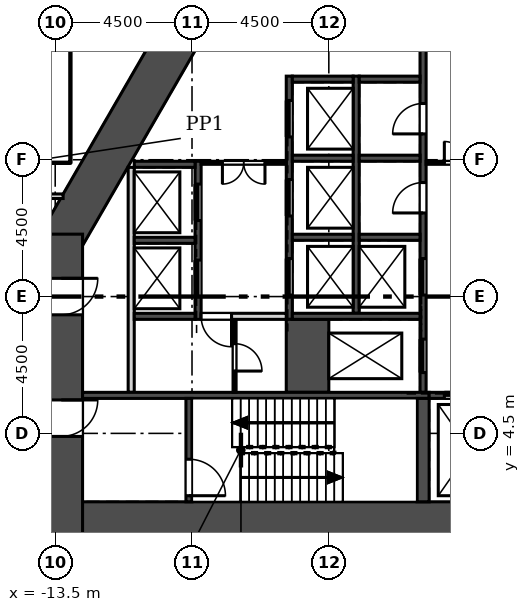
"""IFC4 building model, lengths in metres.
Left out: names, types, materials, properties, quantities, classifications, styles, units other than length and angle.
Written with IfcOpenShell. Run it as: python <this file> out.ifc"""

import sys

from ifc_helpers import new_model, si_unit, direction, frame, frame_2d, origin, place, context, subcontext, project, spatial, rectangle, extrude, element, fill, save


model = new_model("IFC4")
c1 = context("Model", 3, precision=1e-05, world=origin(), true_north=direction((0.0, 1.0)))
c2 = subcontext(c1, "Body", "Model", "MODEL_VIEW")
j1 = project(units=[si_unit("LENGTHUNIT", "METRE"), si_unit("PLANEANGLEUNIT", "RADIAN")], contexts=[c1])
p1 = place(None, origin())
s1 = spatial("IfcSite", under=j1, at=p1, CompositionType="ELEMENT")
p2 = place(p1, origin())
s2 = spatial("IfcBuilding", under=s1, at=p2, CompositionType="ELEMENT")
p3 = place(p2, frame((0.0, 0.0, -8.0)))
s3 = spatial("IfcBuildingStorey", under=s2, at=p3, CompositionType="ELEMENT", Elevation=-8.0)
p4 = place(p3, frame((-4.856, 74.528, 0.0), z_axis=(0.0, 0.0, 1.0), x_axis=(-0.499999312333, -0.866025800809, 0.0)))
e1 = element("IfcWall", 1, at=p4, inside=s3, PredefinedType="SOLIDWALL", context=c2, shape_type="SweptSolid", body=[
    extrude(rectangle(XDim=76.231, YDim=0.6, at=frame_2d((38.115, 0.0))), origin(), (0.0, 0.0, 1.0), 7.6),
])
p5 = place(p3, frame((-14.0, 1.55, 0.0), z_axis=(0.0, 0.0, 1.0), x_axis=(1.0, 0.0, 0.0)))
e2 = element("IfcWall", 2, at=p5, inside=s3, PredefinedType="SHEAR", context=c2, shape_type="SweptSolid", body=[
    extrude(rectangle(XDim=28.0, YDim=1.4, at=frame_2d((14.0, 0.0))), origin(), (0.0, 0.0, 1.0), 8.0),
])
p6 = place(p3, frame((-8.805, 18.65, 0.0), z_axis=(0.0, 0.0, 1.0), x_axis=(-0.50000187635, -0.866024320471, 0.0)))
e3 = element("IfcWall", 3, at=p6, inside=s3, PredefinedType="SHEAR", context=c2, shape_type="SweptSolid", body=[
    extrude(rectangle(XDim=9.177, YDim=1.4, at=frame_2d((4.588, 0.0))), origin(), (0.0, 0.0, 1.0), 8.0),
])
p7 = place(p3, frame((-13.3, 11.052, 0.0), z_axis=(0.0, 0.0, 1.0), x_axis=(0.0, -1.0, 0.0)))
e4 = element("IfcWall", 4, at=p7, inside=s3, PredefinedType="SHEAR", context=c2, shape_type="SweptSolid", body=[
    extrude(rectangle(XDim=10.202, YDim=1.4, at=frame_2d((5.101, 0.0))), origin(), (0.0, 0.0, 1.0), 8.0),
])
p8 = place(p7, frame((5.453, 0.0, 0.0)))
e5 = element("IfcOpeningElement", 5, at=p8, cuts=e4, PredefinedType="OPENING", context=c2, shape_type="SweptSolid", body=[
    extrude(rectangle(XDim=1.2, YDim=2.1, at=frame_2d((0.6, 1.05))), frame((0.0, 0.71, 0.0), z_axis=(0.0, -1.0, 0.0), x_axis=(1.0, 0.0, 0.0)), (0.0, 0.0, 1.0), 1.42),
])
p9 = place(p7, frame((1.453, 0.0, 0.0)))
e6 = element("IfcOpeningElement", 6, at=p9, cuts=e4, PredefinedType="OPENING", context=c2, shape_type="SweptSolid", body=[
    extrude(rectangle(XDim=1.2, YDim=2.1, at=frame_2d((0.6, 1.05))), frame((0.0, 0.71, 0.0), z_axis=(0.0, -1.0, 0.0), x_axis=(1.0, 0.0, 0.0)), (0.0, 0.0, 1.0), 1.42),
])
p10 = place(p3, frame((-11.0, 5.85, 0.0), z_axis=(0.0, 0.0, 1.0), x_axis=(0.0, 1.0, 0.0)))
e7 = element("IfcWall", 7, at=p10, inside=s3, PredefinedType="SOLIDWALL", context=c2, shape_type="SweptSolid", body=[
    extrude(rectangle(XDim=7.4, YDim=0.2, at=frame_2d((3.7, 0.0))), origin(), (0.0, 0.0, 1.0), 7.6),
])
p11 = place(p3, frame((-8.8, 8.25, -0.35), z_axis=(0.0, 0.0, 1.0), x_axis=(0.0, 1.0, 0.0)))
e8 = element("IfcWall", 8, at=p11, inside=s3, PredefinedType="SOLIDWALL", context=c2, shape_type="SweptSolid", body=[
    extrude(rectangle(XDim=5.2, YDim=0.2, at=frame_2d((2.6, 0.0))), origin(), (0.0, 0.0, 1.0), 7.95),
])
p12 = place(p11, frame((0.75, 0.0, 0.35)))
e9 = element("IfcOpeningElement", 9, at=p12, cuts=e8, PredefinedType="OPENING", context=c2, shape_type="SweptSolid", body=[
    extrude(rectangle(XDim=1.2, YDim=2.1, at=frame_2d((0.6, 1.05))), frame((0.0, 0.11, 0.0), z_axis=(0.0, -1.0, 0.0), x_axis=(1.0, 0.0, 0.0)), (0.0, 0.0, 1.0), 0.22),
])
p13 = place(p11, frame((3.25, 0.0, 0.35)))
e10 = element("IfcOpeningElement", 10, at=p13, cuts=e8, PredefinedType="OPENING", context=c2, shape_type="SweptSolid", body=[
    extrude(rectangle(XDim=1.2, YDim=2.1, at=frame_2d((0.6, 1.05))), frame((0.0, 0.11, 0.0), z_axis=(0.0, -1.0, 0.0), x_axis=(1.0, 0.0, 0.0)), (0.0, 0.0, 1.0), 0.22),
])
p14 = place(p3, frame((-5.8, 8.25, -0.35), z_axis=(0.0, 0.0, 1.0), x_axis=(0.0, 1.0, 0.0)))
e11 = element("IfcWall", 11, at=p14, inside=s3, PredefinedType="SOLIDWALL", context=c2, shape_type="SweptSolid", body=[
    extrude(rectangle(XDim=8.0, YDim=0.2, at=frame_2d((4.0, 0.0))), origin(), (0.0, 0.0, 1.0), 7.95),
])
p15 = place(p14, frame((0.8, 0.0, 0.35)))
e12 = element("IfcOpeningElement", 12, at=p15, cuts=e11, PredefinedType="OPENING", context=c2, shape_type="SweptSolid", body=[
    extrude(rectangle(XDim=1.2, YDim=2.1, at=frame_2d((0.6, 1.05))), frame((0.0, 0.11, 0.0), z_axis=(0.0, -1.0, 0.0), x_axis=(1.0, 0.0, 0.0)), (0.0, 0.0, 1.0), 0.22),
])
p16 = place(p14, frame((3.4, 0.0, 0.35)))
e13 = element("IfcOpeningElement", 13, at=p16, cuts=e11, PredefinedType="OPENING", context=c2, shape_type="SweptSolid", body=[
    extrude(rectangle(XDim=1.2, YDim=2.1, at=frame_2d((0.6, 1.05))), frame((0.0, 0.11, 0.0), z_axis=(0.0, -1.0, 0.0), x_axis=(1.0, 0.0, 0.0)), (0.0, 0.0, 1.0), 0.22),
])
p17 = place(p14, frame((6.0, 0.0, 0.35)))
e14 = element("IfcOpeningElement", 14, at=p17, cuts=e11, PredefinedType="OPENING", context=c2, shape_type="SweptSolid", body=[
    extrude(rectangle(XDim=1.2, YDim=2.1, at=frame_2d((0.6, 1.05))), frame((0.0, 0.11, 0.0), z_axis=(0.0, -1.0, 0.0), x_axis=(1.0, 0.0, 0.0)), (0.0, 0.0, 1.0), 0.22),
])
p18 = place(p3, frame((-3.6, 8.45, -0.35), z_axis=(0.0, 0.0, 1.0), x_axis=(0.0, 1.0, 0.0)))
e15 = element("IfcWall", 15, at=p18, inside=s3, PredefinedType="SOLIDWALL", context=c2, shape_type="SweptSolid", body=[
    extrude(rectangle(XDim=7.8, YDim=0.2, at=frame_2d((3.9, 0.0))), origin(), (0.0, 0.0, 1.0), 7.95),
])
p19 = place(p3, frame((-1.4, 5.85, -0.35), z_axis=(0.0, 0.0, 1.0), x_axis=(0.0, 1.0, 0.0)))
e16 = element("IfcWall", 16, at=p19, inside=s3, PredefinedType="SOLIDWALL", context=c2, shape_type="SweptSolid", body=[
    extrude(rectangle(XDim=11.75, YDim=0.2, at=frame_2d((5.875, 0.0))), origin(), (0.0, 0.0, 1.0), 7.95),
])
p20 = place(p19, frame((3.2, 0.0, 0.35)))
e17 = element("IfcOpeningElement", 17, at=p20, cuts=e16, PredefinedType="OPENING", context=c2, shape_type="SweptSolid", body=[
    extrude(rectangle(XDim=1.2, YDim=2.1, at=frame_2d((0.6, 1.05))), frame((0.0, 0.11, 0.0), z_axis=(0.0, -1.0, 0.0), x_axis=(1.0, 0.0, 0.0)), (0.0, 0.0, 1.0), 0.22),
])
p21 = place(p19, frame((0.65, 0.0, 0.35)))
e18 = element("IfcOpeningElement", 18, at=p21, cuts=e16, PredefinedType="OPENING", context=c2, shape_type="SweptSolid", body=[
    extrude(rectangle(XDim=1.1, YDim=2.1, at=frame_2d((0.55, 1.05))), frame((0.0, 0.11, 0.0), z_axis=(0.0, -1.0, 0.0), x_axis=(1.0, 0.0, 0.0)), (0.0, 0.0, 1.0), 0.22),
])
p22 = place(p19, frame((5.9, 0.0, 0.35)))
e19 = element("IfcOpeningElement", 19, at=p22, cuts=e16, PredefinedType="OPENING", context=c2, shape_type="SweptSolid", body=[
    extrude(rectangle(XDim=1.0, YDim=2.1, at=frame_2d((0.5, 1.05))), frame((0.0, 0.11, 0.0), z_axis=(0.0, -1.0, 0.0), x_axis=(1.0, 0.0, 0.0)), (0.0, 0.0, 1.0), 0.22),
])
p23 = place(p19, frame((8.5, 0.0, 0.35)))
e20 = element("IfcOpeningElement", 20, at=p23, cuts=e16, PredefinedType="OPENING", context=c2, shape_type="SweptSolid", body=[
    extrude(rectangle(XDim=1.0, YDim=2.1, at=frame_2d((0.5, 1.05))), frame((0.0, 0.11, 0.0), z_axis=(0.0, -1.0, 0.0), x_axis=(1.0, 0.0, 0.0)), (0.0, 0.0, 1.0), 0.22),
])
p24 = place(p3, frame((-5.2, 5.85, -0.35), z_axis=(0.0, 0.0, 1.0), x_axis=(0.0, 1.0, 0.0)))
e21 = element("IfcWall", 21, at=p24, inside=s3, PredefinedType="SOLIDWALL", context=c2, shape_type="SweptSolid", body=[
    extrude(rectangle(XDim=2.4, YDim=1.4, at=frame_2d((1.2, 0.0))), origin(), (0.0, 0.0, 1.0), 7.95),
])
p25 = place(p3, frame((-10.9, 8.35, -0.35), z_axis=(0.0, 0.0, 1.0), x_axis=(1.0, 0.0, 0.0)))
e22 = element("IfcWall", 22, at=p25, inside=s3, PredefinedType="SOLIDWALL", context=c2, shape_type="SweptSolid", body=[
    extrude(rectangle(XDim=2.0, YDim=0.2, at=frame_2d((1.0, 0.0))), origin(), (0.0, 0.0, 1.0), 7.95),
])
p26 = place(p3, frame((-5.7, 8.35, -0.35), z_axis=(0.0, 0.0, 1.0), x_axis=(1.0, 0.0, 0.0)))
e23 = element("IfcWall", 23, at=p26, inside=s3, PredefinedType="SOLIDWALL", context=c2, shape_type="SweptSolid", body=[
    extrude(rectangle(XDim=4.2, YDim=0.2, at=frame_2d((2.1, 0.0))), origin(), (0.0, 0.0, 1.0), 7.95),
])
p27 = place(p3, frame((-12.6, 5.75, -0.35), z_axis=(0.0, 0.0, 1.0), x_axis=(1.0, 0.0, 0.0)))
e24 = element("IfcWall", 24, at=p27, inside=s3, PredefinedType="SOLIDWALL", context=c2, shape_type="SweptSolid", body=[
    extrude(rectangle(XDim=11.4, YDim=0.2, at=frame_2d((5.7, 0.0))), origin(), (0.0, 0.0, 1.0), 7.95),
])
p28 = place(p3, frame((-1.2, 5.75, -0.35), z_axis=(0.0, 0.0, 1.0), x_axis=(1.0, 0.0, 0.0)))
e25 = element("IfcWall", 25, at=p28, inside=s3, PredefinedType="SOLIDWALL", context=c2, shape_type="SweptSolid", body=[
    extrude(rectangle(XDim=2.4, YDim=0.2, at=frame_2d((1.2, 0.0))), origin(), (0.0, 0.0, 1.0), 7.95),
])
p29 = place(p28, frame((0.5, 0.0, 0.35)))
e26 = element("IfcOpeningElement", 26, at=p29, cuts=e25, PredefinedType="OPENING", context=c2, shape_type="SweptSolid", body=[
    extrude(rectangle(XDim=1.4, YDim=2.1, at=frame_2d((0.7, 1.05))), frame((0.0, 0.11, 0.0), z_axis=(0.0, -1.0, 0.0), x_axis=(1.0, 0.0, 0.0)), (0.0, 0.0, 1.0), 0.22),
])
p30 = place(p3, frame((-9.1, 2.25, -0.35), z_axis=(0.0, 0.0, 1.0), x_axis=(0.0, 1.0, 0.0)))
e27 = element("IfcWall", 27, at=p30, inside=s3, PredefinedType="SOLIDWALL", context=c2, shape_type="SweptSolid", body=[
    extrude(rectangle(XDim=3.4, YDim=0.2, at=frame_2d((1.7, 0.0))), origin(), (0.0, 0.0, 1.0), 7.95),
])
p31 = place(p30, frame((0.2, 0.0, 0.35)))
e28 = element("IfcOpeningElement", 28, at=p31, cuts=e27, PredefinedType="OPENING", context=c2, shape_type="SweptSolid", body=[
    extrude(rectangle(XDim=1.2, YDim=2.1, at=frame_2d((0.6, 1.05))), frame((0.0, 0.11, 0.0), z_axis=(0.0, -1.0, 0.0), x_axis=(1.0, 0.0, 0.0)), (0.0, 0.0, 1.0), 0.22),
])
p32 = place(p3, frame((-1.4, 2.25, -0.35), z_axis=(0.0, 0.0, 1.0), x_axis=(0.0, 1.0, 0.0)))
e29 = element("IfcWall", 29, at=p32, inside=s3, PredefinedType="SOLIDWALL", context=c2, shape_type="SweptSolid", body=[
    extrude(rectangle(XDim=3.4, YDim=0.4, at=frame_2d((1.7, 0.0))), origin(), (0.0, 0.0, 1.0), 7.95),
])
for number, where, z_axis, x_axis in (
    (30, (-10.9, 10.85, -0.35), (0.0, 0.0, 1.0), (1.0, 0.0, 0.0)),
    (31, (-10.9, 13.35, -0.35), (0.0, 0.0, 1.0), (1.0, 0.0, 0.0)),
    (32, (-5.7, 10.95, -0.35), (0.0, 0.0, 1.0), (1.0, 0.0, 0.0)),
    (33, (-5.7, 13.55, -0.35), (0.0, 0.0, 1.0), (1.0, 0.0, 0.0)),
    (34, (-5.7, 16.15, -0.35), (0.0, 0.0, 1.0), (1.0, 0.0, 0.0)),
    (35, (-3.5, 10.95, -0.35), (0.0, 0.0, 1.0), (1.0, 0.0, 0.0)),
    (36, (-3.5, 13.55, -0.35), (0.0, 0.0, 1.0), (1.0, 0.0, 0.0)),
    (37, (-3.5, 16.15, -0.35), (0.0, 0.0, 1.0), (1.0, 0.0, 0.0)),
):
    element("IfcWall", number, at=place(p3, frame(where, z_axis=z_axis, x_axis=x_axis)), inside=s3, PredefinedType="SOLIDWALL", context=c2, shape_type="SweptSolid", body=[
        extrude(rectangle(XDim=2.0, YDim=0.2, at=frame_2d((1.0, 0.0))), origin(), (0.0, 0.0, 1.0), 7.95),
    ])
p33 = place(p3, frame((-8.7, 13.4, 0.0), z_axis=(0.0, 0.0, 1.0), x_axis=(1.0, 0.0, 0.0)))
e38 = element("IfcWall", 38, at=p33, inside=s3, PredefinedType="PARTITIONING", context=c2, shape_type="SweptSolid", body=[
    extrude(rectangle(XDim=2.8, YDim=0.1, at=frame_2d((1.4, 0.0))), origin(), (0.0, 0.0, 1.0), 7.6),
])
p34 = place(p33, frame((0.7, 0.0, 0.0)))
e39 = element("IfcOpeningElement", 39, at=p34, cuts=e38, PredefinedType="OPENING", context=c2, shape_type="SweptSolid", body=[
    extrude(rectangle(XDim=1.4, YDim=2.1, at=frame_2d((0.7, 1.05))), frame((0.0, 0.06, 0.0), z_axis=(0.0, -1.0, 0.0), x_axis=(1.0, 0.0, 0.0)), (0.0, 0.0, 1.0), 0.12),
])
p35 = place(p3, frame((-7.6, 5.85, 0.0), z_axis=(0.0, 0.0, 1.0), x_axis=(0.0, 1.0, 0.0)))
e40 = element("IfcWall", 40, at=p35, inside=s3, PredefinedType="PARTITIONING", context=c2, shape_type="SweptSolid", body=[
    extrude(rectangle(XDim=2.4, YDim=0.1, at=frame_2d((1.2, 0.0))), origin(), (0.0, 0.0, 1.0), 7.6),
])
p36 = place(p35, frame((0.7, 0.0, 0.0)))
e41 = element("IfcOpeningElement", 41, at=p36, cuts=e40, PredefinedType="OPENING", context=c2, shape_type="SweptSolid", body=[
    extrude(rectangle(XDim=0.9, YDim=2.1, at=frame_2d((0.45, 1.05))), frame((0.0, 0.06, 0.0), z_axis=(0.0, -1.0, 0.0), x_axis=(1.0, 0.0, 0.0)), (0.0, 0.0, 1.0), 0.12),
])
p37 = place(p3, frame((-8.7, 8.35, 0.0), z_axis=(0.0, 0.0, 1.0), x_axis=(1.0, 0.0, 0.0)))
e42 = element("IfcWall", 42, at=p37, inside=s3, PredefinedType="SOLIDWALL", context=c2, shape_type="SweptSolid", body=[
    extrude(rectangle(XDim=2.8, YDim=0.2, at=frame_2d((1.4, 0.0))), origin(), (0.0, 0.0, 1.0), 7.6),
])
p38 = place(p37, origin())
e43 = element("IfcOpeningElement", 43, at=p38, cuts=e42, PredefinedType="OPENING", context=c2, shape_type="SweptSolid", body=[
    extrude(rectangle(XDim=1.0, YDim=2.1, at=frame_2d((0.5, 1.05))), frame((0.0, 0.11, 0.0), z_axis=(0.0, -1.0, 0.0), x_axis=(1.0, 0.0, 0.0)), (0.0, 0.0, 1.0), 0.22),
])
p39 = place(p3, frame((-1.3, 13.4, 0.0), z_axis=(0.0, 0.0, 1.0), x_axis=(1.0, 0.0, 0.0)))
e44 = element("IfcWall", 44, at=p39, inside=s3, PredefinedType="PARTITIONING", context=c2, shape_type="SweptSolid", body=[
    extrude(rectangle(XDim=2.6, YDim=0.1, at=frame_2d((1.3, 0.0))), origin(), (0.0, 0.0, 1.0), 7.6),
])
p40 = place(p39, frame((0.6, 0.0, 0.0)))
e45 = element("IfcOpeningElement", 45, at=p40, cuts=e44, PredefinedType="OPENING", context=c2, shape_type="SweptSolid", body=[
    extrude(rectangle(XDim=1.4, YDim=2.1, at=frame_2d((0.7, 1.05))), frame((0.0, 0.06, 0.0), z_axis=(0.0, -1.0, 0.0), x_axis=(1.0, 0.0, 0.0)), (0.0, 0.0, 1.0), 0.12),
])
p41 = place(p3, frame((-30.502, 12.3, 0.0), z_axis=(0.0, 0.0, 1.0), x_axis=(1.0, 0.0, 0.0)))
e46 = element("IfcWall", 46, at=p41, inside=s3, PredefinedType="PARTITIONING", context=c2, shape_type="SweptSolid", body=[
    extrude(rectangle(XDim=17.263, YDim=0.15, at=frame_2d((8.631, 0.0))), origin(), (0.0, 0.0, 1.0), 7.6),
])
p42 = place(p41, frame((9.602, 0.0, 0.0)))
e47 = element("IfcOpeningElement", 47, at=p42, cuts=e46, PredefinedType="OPENING", context=c2, shape_type="SweptSolid", body=[
    extrude(rectangle(XDim=1.8, YDim=2.1, at=frame_2d((0.9, 1.05))), frame((0.0, 0.085, 0.0), z_axis=(0.0, -1.0, 0.0), x_axis=(1.0, 0.0, 0.0)), (0.0, 0.0, 1.0), 0.17),
])
p43 = place(p3, frame((-13.125, 13.45, 0.0), z_axis=(0.0, 0.0, 1.0), x_axis=(0.0, 1.0, 0.0)))
e48 = element("IfcWall", 48, at=p43, inside=s3, PredefinedType="SOLIDWALL", context=c2, shape_type="SweptSolid", body=[
    extrude(rectangle(XDim=5.1, YDim=0.25, at=frame_2d((2.55, 0.0))), origin(), (0.0, 0.0, 1.0), 7.6),
])
p44 = place(p3, frame((-13.125, 13.525, 0.0), z_axis=(0.0, 0.0, 1.0), x_axis=(-1.0, 0.0, 0.0)))
e49 = element("IfcWall", 49, at=p44, inside=s3, PredefinedType="SOLIDWALL", context=c2, shape_type="SweptSolid", body=[
    extrude(rectangle(XDim=2.25, YDim=0.25, at=frame_2d((1.125, 0.0))), origin(), (0.0, 0.0, 1.0), 7.6),
])
p45 = place(p12, origin())
e50 = element("IfcDoor", 50, at=p45, inside=s3, OperationType="SLIDING_TO_LEFT", PredefinedType="DOOR", context=c2, shape_type="SweptSolid", body=[
    extrude(rectangle(XDim=1.2, YDim=2.1, at=frame_2d((0.6, 1.05))), frame((0.0, 0.025, 0.0), z_axis=(0.0, -1.0, 0.0), x_axis=(1.0, 0.0, 0.0)), (0.0, 0.0, 1.0), 0.05),
])
fill(e9, e50)
p46 = place(p13, origin())
e51 = element("IfcDoor", 51, at=p46, inside=s3, OperationType="SLIDING_TO_LEFT", PredefinedType="DOOR", context=c2, shape_type="SweptSolid", body=[
    extrude(rectangle(XDim=1.2, YDim=2.1, at=frame_2d((0.6, 1.05))), frame((0.0, 0.025, 0.0), z_axis=(0.0, -1.0, 0.0), x_axis=(1.0, 0.0, 0.0)), (0.0, 0.0, 1.0), 0.05),
])
fill(e10, e51)
p47 = place(p15, origin())
e52 = element("IfcDoor", 52, at=p47, inside=s3, OperationType="SLIDING_TO_LEFT", PredefinedType="DOOR", context=c2, shape_type="SweptSolid", body=[
    extrude(rectangle(XDim=1.2, YDim=2.1, at=frame_2d((0.6, 1.05))), frame((0.0, 0.025, 0.0), z_axis=(0.0, -1.0, 0.0), x_axis=(1.0, 0.0, 0.0)), (0.0, 0.0, 1.0), 0.05),
])
fill(e12, e52)
p48 = place(p16, origin())
e53 = element("IfcDoor", 53, at=p48, inside=s3, OperationType="SLIDING_TO_LEFT", PredefinedType="DOOR", context=c2, shape_type="SweptSolid", body=[
    extrude(rectangle(XDim=1.2, YDim=2.1, at=frame_2d((0.6, 1.05))), frame((0.0, 0.025, 0.0), z_axis=(0.0, -1.0, 0.0), x_axis=(1.0, 0.0, 0.0)), (0.0, 0.0, 1.0), 0.05),
])
fill(e13, e53)
p49 = place(p17, origin())
e54 = element("IfcDoor", 54, at=p49, inside=s3, OperationType="SLIDING_TO_LEFT", PredefinedType="DOOR", context=c2, shape_type="SweptSolid", body=[
    extrude(rectangle(XDim=1.2, YDim=2.1, at=frame_2d((0.6, 1.05))), frame((0.0, 0.025, 0.0), z_axis=(0.0, -1.0, 0.0), x_axis=(1.0, 0.0, 0.0)), (0.0, 0.0, 1.0), 0.05),
])
fill(e14, e54)
p50 = place(p20, origin())
e55 = element("IfcDoor", 55, at=p50, inside=s3, OperationType="SLIDING_TO_LEFT", PredefinedType="DOOR", context=c2, shape_type="SweptSolid", body=[
    extrude(rectangle(XDim=1.2, YDim=2.1, at=frame_2d((0.6, 1.05))), frame((0.0, 0.025, 0.0), z_axis=(0.0, -1.0, 0.0), x_axis=(1.0, 0.0, 0.0)), (0.0, 0.0, 1.0), 0.05),
])
fill(e17, e55)
p51 = place(p21, origin())
e56 = element("IfcDoor", 56, at=p51, inside=s3, OperationType="SLIDING_TO_RIGHT", PredefinedType="DOOR", context=c2, shape_type="SweptSolid", body=[
    extrude(rectangle(XDim=1.1, YDim=2.1, at=frame_2d((0.55, 1.05))), frame((0.0, 0.025, 0.0), z_axis=(0.0, -1.0, 0.0), x_axis=(1.0, 0.0, 0.0)), (0.0, 0.0, 1.0), 0.05),
])
fill(e18, e56)
p52 = place(p29, origin())
e57 = element("IfcDoor", 57, at=p52, inside=s3, OperationType="SLIDING_TO_LEFT", PredefinedType="DOOR", context=c2, shape_type="SweptSolid", body=[
    extrude(rectangle(XDim=1.4, YDim=2.1, at=frame_2d((0.7, 1.05))), frame((0.0, 0.025, 0.0), z_axis=(0.0, -1.0, 0.0), x_axis=(1.0, 0.0, 0.0)), (0.0, 0.0, 1.0), 0.05),
])
fill(e26, e57)
p53 = place(p22, origin())
e58 = element("IfcDoor", 58, at=p53, inside=s3, OperationType="SINGLE_SWING_LEFT", PredefinedType="DOOR", context=c2, shape_type="SweptSolid", body=[
    extrude(rectangle(XDim=1.0, YDim=2.1, at=frame_2d((0.5, 1.05))), frame((0.0, 0.025, 0.0), z_axis=(0.0, -1.0, 0.0), x_axis=(1.0, 0.0, 0.0)), (0.0, 0.0, 1.0), 0.05),
])
fill(e19, e58)
p54 = place(p23, origin())
e59 = element("IfcDoor", 59, at=p54, inside=s3, OperationType="SINGLE_SWING_LEFT", PredefinedType="DOOR", context=c2, shape_type="SweptSolid", body=[
    extrude(rectangle(XDim=1.0, YDim=2.1, at=frame_2d((0.5, 1.05))), frame((0.0, 0.025, 0.0), z_axis=(0.0, -1.0, 0.0), x_axis=(1.0, 0.0, 0.0)), (0.0, 0.0, 1.0), 0.05),
])
fill(e20, e59)
p55 = place(p34, frame((1.4, 0.0, 0.0), z_axis=(0.0, 0.0, 1.0), x_axis=(-1.0, 0.0, 0.0)))
e60 = element("IfcDoor", 60, at=p55, inside=s3, OperationType="DOUBLE_DOOR_SINGLE_SWING", PredefinedType="DOOR", context=c2, shape_type="SweptSolid", body=[
    extrude(rectangle(XDim=1.4, YDim=2.1, at=frame_2d((0.7, 1.05))), frame((0.0, 0.025, 0.0), z_axis=(0.0, -1.0, 0.0), x_axis=(1.0, 0.0, 0.0)), (0.0, 0.0, 1.0), 0.05),
])
fill(e39, e60)
p56 = place(p38, frame((1.0, 0.0, 0.0), z_axis=(0.0, 0.0, 1.0), x_axis=(-1.0, 0.0, 0.0)))
e61 = element("IfcDoor", 61, at=p56, inside=s3, OperationType="SINGLE_SWING_LEFT", PredefinedType="DOOR", context=c2, shape_type="SweptSolid", body=[
    extrude(rectangle(XDim=1.0, YDim=2.1, at=frame_2d((0.5, 1.05))), frame((0.0, 0.025, 0.0), z_axis=(0.0, -1.0, 0.0), x_axis=(1.0, 0.0, 0.0)), (0.0, 0.0, 1.0), 0.05),
])
fill(e43, e61)
p57 = place(p36, frame((0.9, 0.0, 0.0), z_axis=(0.0, 0.0, 1.0), x_axis=(-1.0, 0.0, 0.0)))
e62 = element("IfcDoor", 62, at=p57, inside=s3, OperationType="SINGLE_SWING_RIGHT", PredefinedType="DOOR", context=c2, shape_type="SweptSolid", body=[
    extrude(rectangle(XDim=0.9, YDim=2.1, at=frame_2d((0.45, 1.05))), frame((0.0, 0.025, 0.0), z_axis=(0.0, -1.0, 0.0), x_axis=(1.0, 0.0, 0.0)), (0.0, 0.0, 1.0), 0.05),
])
fill(e41, e62)
p58 = place(p8, origin())
e63 = element("IfcDoor", 63, at=p58, inside=s3, OperationType="SINGLE_SWING_LEFT", PredefinedType="DOOR", context=c2, shape_type="SweptSolid", body=[
    extrude(rectangle(XDim=1.2, YDim=2.1, at=frame_2d((0.6, 1.05))), frame((0.0, 0.025, 0.0), z_axis=(0.0, -1.0, 0.0), x_axis=(1.0, 0.0, 0.0)), (0.0, 0.0, 1.0), 0.05),
])
fill(e5, e63)
p59 = place(p31, frame((1.2, 0.0, 0.0), z_axis=(0.0, 0.0, 1.0), x_axis=(-1.0, 0.0, 0.0)))
e64 = element("IfcDoor", 64, at=p59, inside=s3, OperationType="SINGLE_SWING_RIGHT", PredefinedType="DOOR", context=c2, shape_type="SweptSolid", body=[
    extrude(rectangle(XDim=1.2, YDim=2.1, at=frame_2d((0.6, 1.05))), frame((0.0, 0.025, 0.0), z_axis=(0.0, -1.0, 0.0), x_axis=(1.0, 0.0, 0.0)), (0.0, 0.0, 1.0), 0.05),
])
fill(e28, e64)
p60 = place(p9, origin())
e65 = element("IfcDoor", 65, at=p60, inside=s3, OperationType="SINGLE_SWING_LEFT", PredefinedType="DOOR", context=c2, shape_type="SweptSolid", body=[
    extrude(rectangle(XDim=1.2, YDim=2.1, at=frame_2d((0.6, 1.05))), frame((0.0, 0.025, 0.0), z_axis=(0.0, -1.0, 0.0), x_axis=(1.0, 0.0, 0.0)), (0.0, 0.0, 1.0), 0.05),
])
fill(e6, e65)
p61 = place(p40, origin())
e66 = element("IfcDoor", 66, at=p61, inside=s3, OperationType="DOUBLE_DOOR_SINGLE_SWING", PredefinedType="DOOR", context=c2, shape_type="SweptSolid", body=[
    extrude(rectangle(XDim=1.4, YDim=2.1, at=frame_2d((0.7, 1.05))), frame((0.0, 0.025, 0.0), z_axis=(0.0, -1.0, 0.0), x_axis=(1.0, 0.0, 0.0)), (0.0, 0.0, 1.0), 0.05),
])
fill(e45, e66)
save(model, sys.argv[1])
